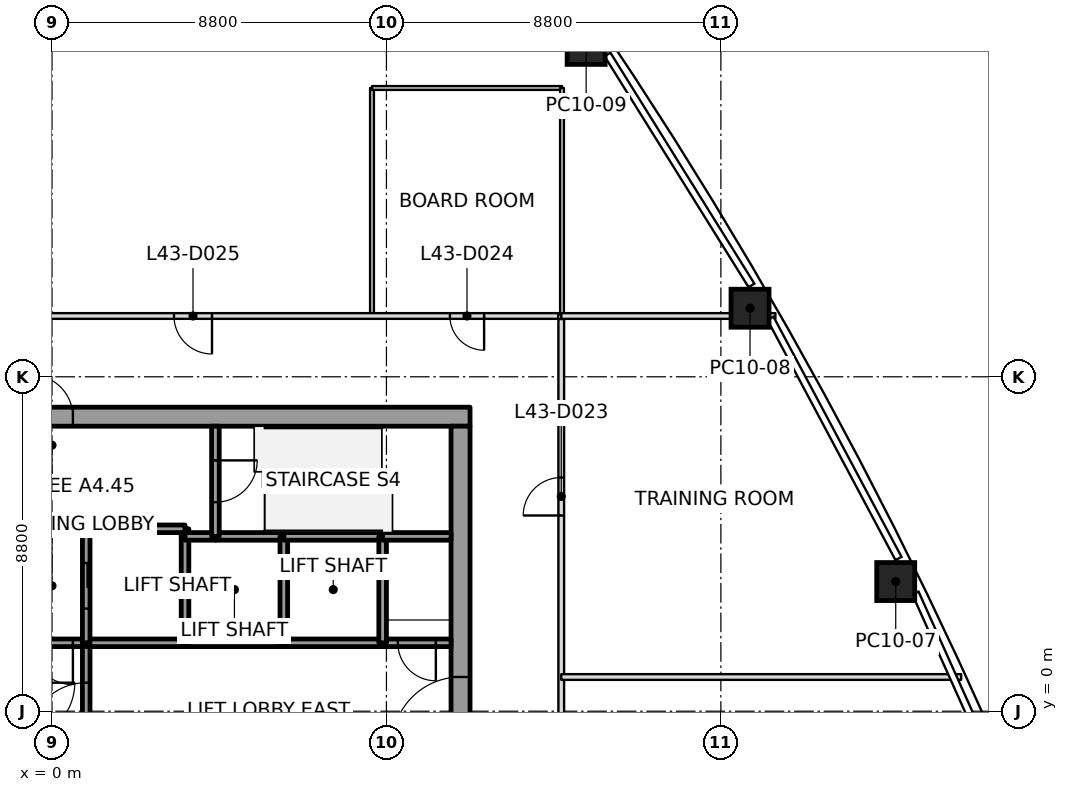
"""IFC4 building model, lengths in metres.
Left out: names, types, materials, properties, quantities, classifications, styles, units other than length and angle.
Written with IfcOpenShell. Run it as: python <this file> out.ifc"""

import sys

from ifc_helpers import new_model, si_unit, direction, frame, frame_2d, origin, origin_2d, place, context, subcontext, project, spatial, rectangle, extrude, element, fill, save


model = new_model("IFC4")
c1 = context("Model", 3, precision=1e-05, world=origin(), true_north=direction((0.0, 1.0)))
c2 = subcontext(c1, "Body", "Model", "MODEL_VIEW")
j1 = project(units=[si_unit("LENGTHUNIT", "METRE"), si_unit("PLANEANGLEUNIT", "RADIAN")], contexts=[c1])
p1 = place(None, origin())
s1 = spatial("IfcSite", under=j1, at=p1, CompositionType="ELEMENT")
p2 = place(p1, origin())
s2 = spatial("IfcBuilding", under=s1, at=p2, CompositionType="ELEMENT")
p3 = place(p2, frame((0.0, 0.0, 193.8)))
s3 = spatial("IfcBuildingStorey", under=s2, at=p3, CompositionType="ELEMENT", Elevation=193.8)
p4 = place(p3, frame((22.201, 3.412, 0.0), z_axis=(-0.014097689605, 0.002074984617, 0.999898469639), x_axis=(-0.440182224659, 0.89787220315, -0.008069442676)))
e1 = element("IfcColumn", 1, at=p4, inside=s3, PredefinedType="COLUMN", context=c2, shape_type="SweptSolid", body=[
    extrude(rectangle(XDim=1.0, YDim=1.0, at=origin_2d()), origin(), (0.0, 0.0, 1.0), 4.0),
])
p5 = place(p3, frame((18.367, 10.604, 0.0), z_axis=(-0.009887049298, -0.00573692984, 0.999934664812), x_axis=(-0.499975560967, 0.866039512843, 2.5126546e-05)))
e2 = element("IfcColumn", 2, at=p5, inside=s3, PredefinedType="COLUMN", context=c2, shape_type="SweptSolid", body=[
    extrude(rectangle(XDim=1.0, YDim=1.0, at=origin_2d()), origin(), (0.0, 0.0, 1.0), 4.0),
])
p6 = place(p3, frame((14.055, 17.521, 0.0), z_axis=(-0.005309522349, -0.013182262383, 0.999899013366), x_axis=(-0.557472120529, 0.830157266209, 0.007984246522)))
e3 = element("IfcColumn", 3, at=p6, inside=s3, PredefinedType="COLUMN", context=c2, shape_type="SweptSolid", body=[
    extrude(rectangle(XDim=1.0, YDim=1.0, at=origin_2d()), origin(), (0.0, 0.0, 1.0), 4.0),
])
p7 = place(p3, frame((-11.0, 7.75, 0.0), z_axis=(0.0, 0.0, 1.0), x_axis=(1.0, 0.0, 0.0)))
e4 = element("IfcWall", 4, at=p7, inside=s3, PredefinedType="SHEAR", context=c2, shape_type="SweptSolid", body=[
    extrude(rectangle(XDim=22.0, YDim=0.5, at=frame_2d((11.0, 0.0))), origin(), (0.0, 0.0, 1.0), 4.0),
])
p8 = place(p7, frame((10.45, 0.0, 0.0)))
e5 = element("IfcOpeningElement", 5, at=p8, cuts=e4, PredefinedType="OPENING", context=c2, shape_type="SweptSolid", body=[
    extrude(rectangle(XDim=1.1, YDim=2.1, at=frame_2d((0.55, 1.05))), frame((0.0, 0.25, 0.0), z_axis=(0.0, -1.0, 0.0), x_axis=(1.0, 0.0, 0.0)), (0.0, 0.0, 1.0), 0.5),
])
p9 = place(p3, frame((10.75, -7.5, 0.0), z_axis=(0.0, 0.0, 1.0), x_axis=(0.0, 1.0, 0.0)))
e6 = element("IfcWall", 6, at=p9, inside=s3, PredefinedType="SHEAR", context=c2, shape_type="SweptSolid", body=[
    extrude(rectangle(XDim=15.0, YDim=0.5, at=frame_2d((7.5, 0.0))), origin(), (0.0, 0.0, 1.0), 4.0),
])
p10 = place(p9, frame((6.6, 0.0, 0.0)))
e7 = element("IfcOpeningElement", 7, at=p10, cuts=e6, PredefinedType="OPENING", context=c2, shape_type="SweptSolid", body=[
    extrude(rectangle(XDim=1.8, YDim=2.1, at=frame_2d((0.9, 1.05))), frame((0.0, 0.25, 0.0), z_axis=(0.0, -1.0, 0.0), x_axis=(1.0, 0.0, 0.0)), (0.0, 0.0, 1.0), 0.5),
])
p11 = place(p3, frame((0.9, 1.8, 0.0), z_axis=(0.0, 0.0, 1.0), x_axis=(-1.0, 0.0, 0.0)))
e8 = element("IfcWall", 8, at=p11, inside=s3, PredefinedType="SOLIDWALL", context=c2, shape_type="SweptSolid", body=[
    extrude(rectangle(XDim=1.8, YDim=0.2, at=frame_2d((0.9, 0.0))), origin(), (0.0, 0.0, 1.0), 3.85),
])
p12 = place(p11, frame((0.35, 0.0, 0.0)))
e9 = element("IfcOpeningElement", 9, at=p12, cuts=e8, PredefinedType="OPENING", context=c2, shape_type="SweptSolid", body=[
    extrude(rectangle(XDim=1.1, YDim=2.1, at=frame_2d((0.55, 1.05))), frame((0.0, 0.1, 0.0), z_axis=(0.0, -1.0, 0.0), x_axis=(1.0, 0.0, 0.0)), (0.0, 0.0, 1.0), 0.2),
])
p13 = place(p3, frame((0.9, -1.8, 0.0), z_axis=(0.0, 0.0, 1.0), x_axis=(0.0, 1.0, 0.0)))
e10 = element("IfcWall", 10, at=p13, inside=s3, PredefinedType="SOLIDWALL", context=c2, shape_type="SweptSolid", body=[
    extrude(rectangle(XDim=3.6, YDim=0.2, at=frame_2d((1.8, 0.0))), origin(), (0.0, 0.0, 1.0), 3.85),
])
p14 = place(p13, frame((1.05, 0.0, 0.0)))
e11 = element("IfcOpeningElement", 11, at=p14, cuts=e10, PredefinedType="OPENING", context=c2, shape_type="SweptSolid", body=[
    extrude(rectangle(XDim=1.5, YDim=2.1, at=frame_2d((0.75, 1.05))), frame((0.0, 0.1, 0.0), z_axis=(0.0, -1.0, 0.0), x_axis=(1.0, 0.0, 0.0)), (0.0, 0.0, 1.0), 0.2),
])
p15 = place(p3, frame((3.5, 1.8, 0.0), z_axis=(0.0, 0.0, 1.0), x_axis=(-1.0, 0.0, 0.0)))
e12 = element("IfcWall", 12, at=p15, inside=s3, PredefinedType="SOLIDWALL", context=c2, shape_type="SweptSolid", body=[
    extrude(rectangle(XDim=2.6, YDim=0.2, at=frame_2d((1.3, 0.0))), origin(), (0.0, 0.0, 1.0), 3.85),
])
p16 = place(p3, frame((3.5, 4.6, 0.0), z_axis=(0.0, 0.0, 1.0), x_axis=(0.0, 1.0, 0.0)))
e13 = element("IfcWall", 13, at=p16, inside=s3, PredefinedType="SOLIDWALL", context=c2, shape_type="SweptSolid", body=[
    extrude(rectangle(XDim=0.2, YDim=0.2, at=frame_2d((0.1, 0.0))), origin(), (0.0, 0.0, 1.0), 3.85),
])
p17 = place(p3, frame((3.5, 4.8, 0.0), z_axis=(0.0, 0.0, 1.0), x_axis=(-1.0, 0.0, 0.0)))
e14 = element("IfcWall", 14, at=p17, inside=s3, PredefinedType="SOLIDWALL", context=c2, shape_type="SweptSolid", body=[
    extrude(rectangle(XDim=2.6, YDim=0.2, at=frame_2d((1.3, 0.0))), origin(), (0.0, 0.0, 1.0), 3.85),
])
p18 = place(p3, frame((0.9, 4.8, 0.0), z_axis=(0.0, 0.0, 1.0), x_axis=(0.0, -1.0, 0.0)))
e15 = element("IfcWall", 15, at=p18, inside=s3, PredefinedType="SOLIDWALL", context=c2, shape_type="SweptSolid", body=[
    extrude(rectangle(XDim=3.0, YDim=0.2, at=frame_2d((1.5, 0.0))), origin(), (0.0, 0.0, 1.0), 3.85),
])
p19 = place(p18, frame((0.9, 0.0, 0.0)))
e16 = element("IfcOpeningElement", 16, at=p19, cuts=e15, PredefinedType="OPENING", context=c2, shape_type="SweptSolid", body=[
    extrude(rectangle(XDim=1.2, YDim=2.1, at=frame_2d((0.6, 1.05))), frame((0.0, 0.1, 0.0), z_axis=(0.0, -1.0, 0.0), x_axis=(1.0, 0.0, 0.0)), (0.0, 0.0, 1.0), 0.2),
])
p20 = place(p3, frame((6.1, 1.8, 0.0), z_axis=(0.0, 0.0, 1.0), x_axis=(-1.0, 0.0, 0.0)))
e17 = element("IfcWall", 17, at=p20, inside=s3, PredefinedType="SOLIDWALL", context=c2, shape_type="SweptSolid", body=[
    extrude(rectangle(XDim=2.6, YDim=0.2, at=frame_2d((1.3, 0.0))), origin(), (0.0, 0.0, 1.0), 3.85),
])
p21 = place(p3, frame((3.5, 1.8, 0.0), z_axis=(0.0, 0.0, 1.0), x_axis=(0.0, 1.0, 0.0)))
e18 = element("IfcWall", 18, at=p21, inside=s3, PredefinedType="SOLIDWALL", context=c2, shape_type="SweptSolid", body=[
    extrude(rectangle(XDim=2.8, YDim=0.2, at=frame_2d((1.4, 0.0))), origin(), (0.0, 0.0, 1.0), 3.85),
])
p22 = place(p3, frame((4.3, 4.6, 0.0), z_axis=(0.0, 0.0, 1.0), x_axis=(-1.0, 0.0, 0.0)))
e19 = element("IfcWall", 19, at=p22, inside=s3, PredefinedType="SOLIDWALL", context=c2, shape_type="SweptSolid", body=[
    extrude(rectangle(XDim=0.8, YDim=0.2, at=frame_2d((0.4, 0.0))), origin(), (0.0, 0.0, 1.0), 3.85),
])
p23 = place(p3, frame((6.1, 4.6, 0.0), z_axis=(0.0, 0.0, 1.0), x_axis=(-1.0, 0.0, 0.0)))
e20 = element("IfcWall", 20, at=p23, inside=s3, PredefinedType="SOLIDWALL", context=c2, shape_type="SweptSolid", body=[
    extrude(rectangle(XDim=1.8, YDim=0.2, at=frame_2d((0.9, 0.0))), origin(), (0.0, 0.0, 1.0), 3.85),
])
p24 = place(p3, frame((4.3, 7.5, 0.0), z_axis=(0.0, 0.0, 1.0), x_axis=(0.0, -1.0, 0.0)))
e21 = element("IfcWall", 21, at=p24, inside=s3, PredefinedType="SOLIDWALL", context=c2, shape_type="SweptSolid", body=[
    extrude(rectangle(XDim=2.9, YDim=0.2, at=frame_2d((1.45, 0.0))), origin(), (0.0, 0.0, 1.0), 3.85),
])
p25 = place(p24, frame((0.9, 0.0, 0.0)))
e22 = element("IfcOpeningElement", 22, at=p25, cuts=e21, PredefinedType="OPENING", context=c2, shape_type="SweptSolid", body=[
    extrude(rectangle(XDim=1.1, YDim=2.1, at=frame_2d((0.55, 1.05))), frame((0.0, 0.1, 0.0), z_axis=(0.0, -1.0, 0.0), x_axis=(1.0, 0.0, 0.0)), (0.0, 0.0, 1.0), 0.2),
])
p26 = place(p3, frame((8.7, 1.8, 0.0), z_axis=(0.0, 0.0, 1.0), x_axis=(-1.0, 0.0, 0.0)))
e23 = element("IfcWall", 23, at=p26, inside=s3, PredefinedType="SOLIDWALL", context=c2, shape_type="SweptSolid", body=[
    extrude(rectangle(XDim=2.6, YDim=0.2, at=frame_2d((1.3, 0.0))), origin(), (0.0, 0.0, 1.0), 3.85),
])
p27 = place(p3, frame((6.1, 1.8, 0.0), z_axis=(0.0, 0.0, 1.0), x_axis=(0.0, 1.0, 0.0)))
e24 = element("IfcWall", 24, at=p27, inside=s3, PredefinedType="SOLIDWALL", context=c2, shape_type="SweptSolid", body=[
    extrude(rectangle(XDim=2.8, YDim=0.2, at=frame_2d((1.4, 0.0))), origin(), (0.0, 0.0, 1.0), 3.85),
])
p28 = place(p3, frame((8.7, 4.6, 0.0), z_axis=(0.0, 0.0, 1.0), x_axis=(-1.0, 0.0, 0.0)))
e25 = element("IfcWall", 25, at=p28, inside=s3, PredefinedType="SOLIDWALL", context=c2, shape_type="SweptSolid", body=[
    extrude(rectangle(XDim=2.6, YDim=0.2, at=frame_2d((1.3, 0.0))), origin(), (0.0, 0.0, 1.0), 3.85),
])
p29 = place(p3, frame((10.5, 1.8, 0.0), z_axis=(0.0, 0.0, 1.0), x_axis=(-1.0, 0.0, 0.0)))
e26 = element("IfcWall", 26, at=p29, inside=s3, PredefinedType="SOLIDWALL", context=c2, shape_type="SweptSolid", body=[
    extrude(rectangle(XDim=1.8, YDim=0.2, at=frame_2d((0.9, 0.0))), origin(), (0.0, 0.0, 1.0), 3.85),
])
p30 = place(p29, frame((0.4, 0.0, 0.0)))
e27 = element("IfcOpeningElement", 27, at=p30, cuts=e26, PredefinedType="OPENING", context=c2, shape_type="SweptSolid", body=[
    extrude(rectangle(XDim=1.0, YDim=2.1, at=frame_2d((0.5, 1.05))), frame((0.0, 0.1, 0.0), z_axis=(0.0, -1.0, 0.0), x_axis=(1.0, 0.0, 0.0)), (0.0, 0.0, 1.0), 0.2),
])
p31 = place(p3, frame((8.7, 4.6, 0.0), z_axis=(0.0, 0.0, 1.0), x_axis=(0.0, -1.0, 0.0)))
e28 = element("IfcWall", 28, at=p31, inside=s3, PredefinedType="SOLIDWALL", context=c2, shape_type="SweptSolid", body=[
    extrude(rectangle(XDim=2.8, YDim=0.2, at=frame_2d((1.4, 0.0))), origin(), (0.0, 0.0, 1.0), 3.85),
])
p32 = place(p3, frame((10.5, 4.6, 0.0), z_axis=(0.0, 0.0, 1.0), x_axis=(-1.0, 0.0, 0.0)))
e29 = element("IfcWall", 29, at=p32, inside=s3, PredefinedType="SOLIDWALL", context=c2, shape_type="SweptSolid", body=[
    extrude(rectangle(XDim=1.8, YDim=0.2, at=frame_2d((0.9, 0.0))), origin(), (0.0, 0.0, 1.0), 3.85),
])
p33 = place(p3, frame((23.922, 0.9, 0.0), z_axis=(0.0, 0.0, 1.0), x_axis=(-1.0, 0.0, 0.0)))
e30 = element("IfcWall", 30, at=p33, inside=s3, PredefinedType="PARTITIONING", context=c2, shape_type="SweptSolid", body=[
    extrude(rectangle(XDim=10.522, YDim=0.15, at=frame_2d((5.261, 0.0))), origin(), (0.0, 0.0, 1.0), 3.234),
])
p34 = place(p3, frame((13.4, 10.4, 0.0), z_axis=(0.0, 0.0, 1.0), x_axis=(1.0, 0.0, 0.0)))
e31 = element("IfcWall", 31, at=p34, inside=s3, PredefinedType="PARTITIONING", context=c2, shape_type="SweptSolid", body=[
    extrude(rectangle(XDim=5.635, YDim=0.15, at=frame_2d((2.817, 0.0))), origin(), (0.0, 0.0, 1.0), 3.45),
])
p35 = place(p3, frame((13.32, 10.4, 0.0), z_axis=(0.0, 0.0, 1.0), x_axis=(-1.0, 0.0, 0.0)))
e32 = element("IfcWall", 32, at=p35, inside=s3, PredefinedType="PARTITIONING", context=c2, shape_type="SweptSolid", body=[
    extrude(rectangle(XDim=26.64, YDim=0.15, at=frame_2d((13.32, 0.0))), origin(), (0.0, 0.0, 1.0), 3.166),
])
p36 = place(p35, frame((1.95, 0.0, 0.0)))
e33 = element("IfcOpeningElement", 33, at=p36, cuts=e32, PredefinedType="OPENING", context=c2, shape_type="SweptSolid", body=[
    extrude(rectangle(XDim=0.9, YDim=2.1, at=frame_2d((0.45, 1.05))), frame((0.0, 0.075, 0.0), z_axis=(0.0, -1.0, 0.0), x_axis=(1.0, 0.0, 0.0)), (0.0, 0.0, 1.0), 0.15),
])
p37 = place(p35, frame((9.11, 0.0, 0.0)))
e34 = element("IfcOpeningElement", 34, at=p37, cuts=e32, PredefinedType="OPENING", context=c2, shape_type="SweptSolid", body=[
    extrude(rectangle(XDim=1.0, YDim=2.1, at=frame_2d((0.5, 1.05))), frame((0.0, 0.075, 0.0), z_axis=(0.0, -1.0, 0.0), x_axis=(1.0, 0.0, 0.0)), (0.0, 0.0, 1.0), 0.15),
])
p38 = place(p35, frame((15.57, 0.0, 0.0)))
e35 = element("IfcOpeningElement", 35, at=p38, cuts=e32, PredefinedType="OPENING", context=c2, shape_type="SweptSolid", body=[
    extrude(rectangle(XDim=0.9, YDim=2.1, at=frame_2d((0.45, 1.05))), frame((0.0, 0.075, 0.0), z_axis=(0.0, -1.0, 0.0), x_axis=(1.0, 0.0, 0.0)), (0.0, 0.0, 1.0), 0.15),
])
p39 = place(p35, frame((21.83, 0.0, 0.0)))
e36 = element("IfcOpeningElement", 36, at=p39, cuts=e32, PredefinedType="OPENING", context=c2, shape_type="SweptSolid", body=[
    extrude(rectangle(XDim=1.0, YDim=2.1, at=frame_2d((0.5, 1.05))), frame((0.0, 0.075, 0.0), z_axis=(0.0, -1.0, 0.0), x_axis=(1.0, 0.0, 0.0)), (0.0, 0.0, 1.0), 0.15),
])
p40 = place(p3, frame((13.4, -10.32, 0.0), z_axis=(0.0, 0.0, 1.0), x_axis=(0.0, 1.0, 0.0)))
e37 = element("IfcWall", 37, at=p40, inside=s3, PredefinedType="PARTITIONING", context=c2, shape_type="SweptSolid", body=[
    extrude(rectangle(XDim=20.64, YDim=0.15, at=frame_2d((10.32, 0.0))), origin(), (0.0, 0.0, 1.0), 3.166),
])
p41 = place(p40, frame((15.47, 0.0, 0.0)))
e38 = element("IfcOpeningElement", 38, at=p41, cuts=e37, PredefinedType="OPENING", context=c2, shape_type="SweptSolid", body=[
    extrude(rectangle(XDim=1.0, YDim=2.1, at=frame_2d((0.5, 1.05))), frame((0.0, 0.075, 0.0), z_axis=(0.0, -1.0, 0.0), x_axis=(1.0, 0.0, 0.0)), (0.0, 0.0, 1.0), 0.15),
])
p42 = place(p40, frame((1.95, 0.0, 0.0)))
e39 = element("IfcOpeningElement", 39, at=p42, cuts=e37, PredefinedType="OPENING", context=c2, shape_type="SweptSolid", body=[
    extrude(rectangle(XDim=0.9, YDim=2.1, at=frame_2d((0.45, 1.05))), frame((0.0, 0.075, 0.0), z_axis=(0.0, -1.0, 0.0), x_axis=(1.0, 0.0, 0.0)), (0.0, 0.0, 1.0), 0.15),
])
p43 = place(p40, frame((7.61, 0.0, 0.0)))
e40 = element("IfcOpeningElement", 40, at=p43, cuts=e37, PredefinedType="OPENING", context=c2, shape_type="SweptSolid", body=[
    extrude(rectangle(XDim=1.0, YDim=2.1, at=frame_2d((0.5, 1.05))), frame((0.0, 0.075, 0.0), z_axis=(0.0, -1.0, 0.0), x_axis=(1.0, 0.0, 0.0)), (0.0, 0.0, 1.0), 0.15),
])
p44 = place(p3, frame((8.42, 10.43, 0.0), z_axis=(0.0, 0.0, 1.0), x_axis=(0.0, 1.0, 0.0)))
e41 = element("IfcWall", 41, at=p44, inside=s3, PredefinedType="PARTITIONING", context=c2, shape_type="SweptSolid", body=[
    extrude(rectangle(XDim=5.97, YDim=0.1, at=frame_2d((2.985, 0.0))), origin(), (0.0, 0.0, 1.0), 3.317),
])
p45 = place(p3, frame((8.42, 16.4, 0.0), z_axis=(0.0, 0.0, 1.0), x_axis=(1.0, 0.0, 0.0)))
e42 = element("IfcWall", 42, at=p45, inside=s3, PredefinedType="PARTITIONING", context=c2, shape_type="SweptSolid", body=[
    extrude(rectangle(XDim=5.0, YDim=0.1, at=frame_2d((2.5, 0.0))), origin(), (0.0, 0.0, 1.0), 3.45),
])
p46 = place(p3, frame((13.42, 16.4, 0.0), z_axis=(0.0, 0.0, 1.0), x_axis=(0.0, -1.0, 0.0)))
e43 = element("IfcWall", 43, at=p46, inside=s3, PredefinedType="PARTITIONING", context=c2, shape_type="SweptSolid", body=[
    extrude(rectangle(XDim=5.97, YDim=0.1, at=frame_2d((2.985, 0.0))), origin(), (0.0, 0.0, 1.0), 3.317),
])
p47 = place(p41, origin())
e44 = element("IfcDoor", 44, at=p47, inside=s3, OperationType="SINGLE_SWING_RIGHT", PredefinedType="DOOR", context=c2, shape_type="SweptSolid", body=[
    extrude(rectangle(XDim=1.0, YDim=2.1, at=frame_2d((0.5, 1.05))), frame((0.0, 0.025, 0.0), z_axis=(0.0, -1.0, 0.0), x_axis=(1.0, 0.0, 0.0)), (0.0, 0.0, 1.0), 0.05),
])
fill(e38, e44)
p48 = place(p36, origin())
e45 = element("IfcDoor", 45, at=p48, inside=s3, OperationType="SINGLE_SWING_LEFT", PredefinedType="DOOR", context=c2, shape_type="SweptSolid", body=[
    extrude(rectangle(XDim=0.9, YDim=2.1, at=frame_2d((0.45, 1.05))), frame((0.0, 0.025, 0.0), z_axis=(0.0, -1.0, 0.0), x_axis=(1.0, 0.0, 0.0)), (0.0, 0.0, 1.0), 0.05),
])
fill(e33, e45)
p49 = place(p37, origin())
e46 = element("IfcDoor", 46, at=p49, inside=s3, OperationType="SINGLE_SWING_LEFT", PredefinedType="DOOR", context=c2, shape_type="SweptSolid", body=[
    extrude(rectangle(XDim=1.0, YDim=2.1, at=frame_2d((0.5, 1.05))), frame((0.0, 0.025, 0.0), z_axis=(0.0, -1.0, 0.0), x_axis=(1.0, 0.0, 0.0)), (0.0, 0.0, 1.0), 0.05),
])
fill(e34, e46)
p50 = place(p19, origin())
e47 = element("IfcDoor", 47, at=p50, inside=s3, OperationType="SLIDING_TO_LEFT", PredefinedType="DOOR", context=c2, shape_type="SweptSolid", body=[
    extrude(rectangle(XDim=1.2, YDim=2.1, at=frame_2d((0.6, 1.05))), frame((0.0, 0.025, 0.0), z_axis=(0.0, -1.0, 0.0), x_axis=(1.0, 0.0, 0.0)), (0.0, 0.0, 1.0), 0.05),
])
fill(e16, e47)
p51 = place(p14, origin())
e48 = element("IfcDoor", 48, at=p51, inside=s3, OperationType="DOUBLE_DOOR_SINGLE_SWING", PredefinedType="DOOR", context=c2, shape_type="SweptSolid", body=[
    extrude(rectangle(XDim=1.5, YDim=2.1, at=frame_2d((0.75, 1.05))), frame((0.0, 0.025, 0.0), z_axis=(0.0, -1.0, 0.0), x_axis=(1.0, 0.0, 0.0)), (0.0, 0.0, 1.0), 0.05),
])
fill(e11, e48)
p52 = place(p12, origin())
e49 = element("IfcDoor", 49, at=p52, inside=s3, OperationType="SINGLE_SWING_LEFT", PredefinedType="DOOR", context=c2, shape_type="SweptSolid", body=[
    extrude(rectangle(XDim=1.1, YDim=2.1, at=frame_2d((0.55, 1.05))), frame((0.0, 0.025, 0.0), z_axis=(0.0, -1.0, 0.0), x_axis=(1.0, 0.0, 0.0)), (0.0, 0.0, 1.0), 0.05),
])
fill(e9, e49)
p53 = place(p30, origin())
e50 = element("IfcDoor", 50, at=p53, inside=s3, OperationType="SINGLE_SWING_RIGHT", PredefinedType="DOOR", context=c2, shape_type="SweptSolid", body=[
    extrude(rectangle(XDim=1.0, YDim=2.1, at=frame_2d((0.5, 1.05))), frame((0.0, 0.025, 0.0), z_axis=(0.0, -1.0, 0.0), x_axis=(1.0, 0.0, 0.0)), (0.0, 0.0, 1.0), 0.05),
])
fill(e27, e50)
p54 = place(p25, origin())
e51 = element("IfcDoor", 51, at=p54, inside=s3, OperationType="SINGLE_SWING_LEFT", PredefinedType="DOOR", context=c2, shape_type="SweptSolid", body=[
    extrude(rectangle(XDim=1.1, YDim=2.1, at=frame_2d((0.55, 1.05))), frame((0.0, 0.025, 0.0), z_axis=(0.0, -1.0, 0.0), x_axis=(1.0, 0.0, 0.0)), (0.0, 0.0, 1.0), 0.05),
])
fill(e22, e51)
p55 = place(p10, origin())
e52 = element("IfcDoor", 52, at=p55, inside=s3, OperationType="DOUBLE_DOOR_SINGLE_SWING", PredefinedType="DOOR", context=c2, shape_type="SweptSolid", body=[
    extrude(rectangle(XDim=1.8, YDim=2.1, at=frame_2d((0.9, 1.05))), frame((0.0, 0.025, 0.0), z_axis=(0.0, -1.0, 0.0), x_axis=(1.0, 0.0, 0.0)), (0.0, 0.0, 1.0), 0.05),
])
fill(e7, e52)
p56 = place(p8, origin())
e53 = element("IfcDoor", 53, at=p56, inside=s3, OperationType="SINGLE_SWING_LEFT", PredefinedType="DOOR", context=c2, shape_type="SweptSolid", body=[
    extrude(rectangle(XDim=1.1, YDim=2.1, at=frame_2d((0.55, 1.05))), frame((0.0, 0.025, 0.0), z_axis=(0.0, -1.0, 0.0), x_axis=(1.0, 0.0, 0.0)), (0.0, 0.0, 1.0), 0.05),
])
fill(e5, e53)
save(model, sys.argv[1])
